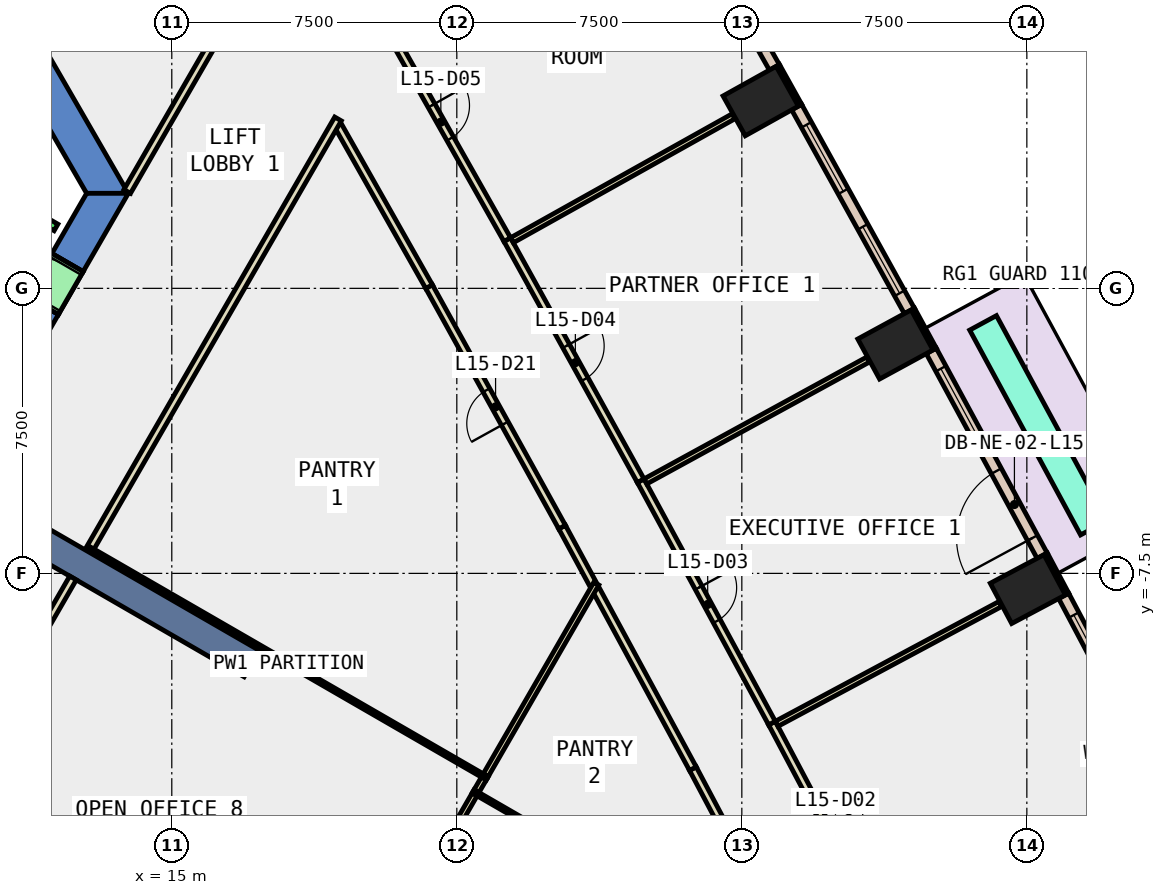
"""IFC4 building model, lengths in metres.
Left out: names, types, materials, properties, quantities, classifications, styles, units other than length and angle.
Written with IfcOpenShell. Run it as: python <this file> out.ifc"""

import sys

from ifc_helpers import new_model, si_unit, direction, frame, frame_2d, origin, origin_2d, place, context, subcontext, project, spatial, polyline, rectangle, outline, extrude, element, fill, save


model = new_model("IFC4")
c1 = context("Model", 3, precision=1e-05, world=origin(), true_north=direction((0.0, 1.0)))
c2 = subcontext(c1, "Body", "Model", "MODEL_VIEW")
j1 = project(units=[si_unit("LENGTHUNIT", "METRE"), si_unit("PLANEANGLEUNIT", "RADIAN")], contexts=[c1])
p1 = place(None, origin())
s1 = spatial("IfcSite", under=j1, at=p1, CompositionType="ELEMENT")
p2 = place(p1, origin())
s2 = spatial("IfcBuilding", under=s1, at=p2, CompositionType="ELEMENT")
p3 = place(p2, frame((0.0, 0.0, 72.8)))
s3 = spatial("IfcBuildingStorey", under=s2, at=p3, CompositionType="ELEMENT", Elevation=72.8)
for number, where, z_axis, x_axis in (
    (1, (37.526, -7.914, -0.4), (0.0, 0.0, 1.0), (-0.469, 0.883, 0.0)),
    (2, (34.041, -1.477, -0.4), (0.0, 0.0, 1.0), (-0.478, 0.878, 0.0)),
    (3, (30.497, 4.928, -0.4), (0.0, 0.0, 1.0), (-0.487, 0.873, 0.0)),
):
    element("IfcColumn", number, at=place(p3, frame(where, z_axis=z_axis, x_axis=x_axis)), inside=s3, PredefinedType="COLUMN", context=c2, shape_type="SweptSolid", body=[
        extrude(rectangle(XDim=1.2, YDim=1.6, at=origin_2d()), origin(), (0.0, 0.0, 1.0), 4.2),
    ])
p4 = place(p3, frame((0.0, 0.0, -0.4)))
e4 = element("IfcWall", 4, at=p4, inside=s3, PredefinedType="SHEAR", context=c2, shape_type="SweptSolid", body=[
    extrude(outline(polyline([(8.517, 11.748), (7.694, 11.273), (12.759, 2.5), (13.856, 2.5), (8.517, 11.748)])), origin(), (0.0, 0.0, 1.0), 4.2),
])
p5 = place(p3, frame((0.0, 0.0, -0.4)))
e5 = element("IfcWall", 5, at=p5, inside=s3, PredefinedType="SHEAR", context=c2, shape_type="SweptSolid", body=[
    extrude(outline(polyline([(12.017, -0.686), (11.194, -0.211), (10.544, -1.336), (11.367, -1.811), (12.017, -0.686)])), origin(), (0.0, 0.0, 1.0), 4.2),
])
p6 = place(p3, frame((0.0, 0.0, -0.4)))
e6 = element("IfcWall", 6, at=p6, inside=s3, PredefinedType="SHEAR", context=c2, shape_type="SweptSolid", body=[
    extrude(outline(polyline([(11.844, 0.915), (12.667, 0.44), (13.856, 2.5), (12.759, 2.5), (11.844, 0.915)])), origin(), (0.0, 0.0, 1.0), 4.2),
])
p7 = place(p3, frame((0.0, 0.0, 3.6)))
e7 = element("IfcWall", 7, at=p7, inside=s3, PredefinedType="SHEAR", context=c2, shape_type="SweptSolid", body=[
    extrude(outline(polyline([(12.667, 0.44), (11.844, 0.915), (11.194, -0.211), (12.017, -0.686), (12.667, 0.44)])), origin(), (0.0, 0.0, 1.0), 0.2),
])
p8 = place(p3, frame((9.31, -5.375, -0.4), z_axis=(0.0, 0.0, 1.0), x_axis=(0.866017533419, -0.500013631625, 0.0)))
e8 = element("IfcWall", 8, at=p8, inside=s3, PredefinedType="SHEAR", context=c2, shape_type="SweptSolid", body=[
    extrude(rectangle(XDim=9.0, YDim=0.8, at=frame_2d((4.5, 0.0))), origin(), (0.0, 0.0, 1.0), 4.2),
])
p9 = place(p3, frame((38.558, -8.045, 0.0), z_axis=(0.0, 0.0, 1.0), x_axis=(-0.469467784567, 0.882949601763, 0.0)))
e9 = element("IfcWall", 9, at=p9, inside=s3, PredefinedType="STANDARD", context=c2, shape_type="SweptSolid", body=[
    extrude(rectangle(XDim=1.199, YDim=0.1, at=frame_2d((0.6, 0.0))), origin(), (0.0, 0.0, 1.0), 3.8),
])
p10 = place(p3, frame((35.074, -1.598, 0.0), z_axis=(0.0, 0.0, 1.0), x_axis=(-0.478267644701, 0.878214131082, 0.0)))
e10 = element("IfcWall", 10, at=p10, inside=s3, PredefinedType="STANDARD", context=c2, shape_type="SweptSolid", body=[
    extrude(rectangle(XDim=1.2, YDim=0.1, at=frame_2d((0.6, 0.0))), origin(), (0.0, 0.0, 1.0), 3.8),
])
p11 = place(p3, frame((31.531, 4.818, 0.0), z_axis=(0.0, 0.0, 1.0), x_axis=(-0.486817526853, 0.873503689488, 0.0)))
e11 = element("IfcWall", 11, at=p11, inside=s3, PredefinedType="STANDARD", context=c2, shape_type="SweptSolid", body=[
    extrude(rectangle(XDim=1.2, YDim=0.1, at=frame_2d((0.6, 0.0))), origin(), (0.0, 0.0, 1.0), 3.8),
])
p12 = place(p3, frame((41.409, -13.644, 0.0), z_axis=(0.0, 0.0, 1.0), x_axis=(-0.467968066899, 0.883745375299, 0.0)))
e12 = element("IfcWall", 12, at=p12, inside=s3, PredefinedType="STANDARD", context=c2, shape_type="SweptSolid", body=[
    extrude(rectangle(XDim=6.282, YDim=0.3, at=frame_2d((3.141, 0.0))), origin(), (0.0, 0.0, 1.0), 3.8),
])
p13 = place(p12, frame((0.571, 0.0, 0.9)))
e13 = element("IfcOpeningElement", 13, at=p13, cuts=e12, PredefinedType="OPENING", context=c2, shape_type="SweptSolid", body=[
    extrude(rectangle(XDim=2.0, YDim=2.6, at=frame_2d((1.0, 1.3))), frame((0.0, 0.16, 0.0), z_axis=(0.0, -1.0, 0.0), x_axis=(1.0, 0.0, 0.0)), (0.0, 0.0, 1.0), 0.32),
])
p14 = place(p12, frame((3.712, 0.0, 0.9)))
e14 = element("IfcOpeningElement", 14, at=p14, cuts=e12, PredefinedType="OPENING", context=c2, shape_type="SweptSolid", body=[
    extrude(rectangle(XDim=2.0, YDim=2.6, at=frame_2d((1.0, 1.3))), frame((0.0, 0.16, 0.0), z_axis=(0.0, -1.0, 0.0), x_axis=(1.0, 0.0, 0.0)), (0.0, 0.0, 1.0), 0.32),
])
p15 = place(p3, frame((37.903, -7.036, 0.0), z_axis=(0.0, 0.0, 1.0), x_axis=(-0.476174096946, 0.879351027404, 0.0)))
e15 = element("IfcWall", 15, at=p15, inside=s3, PredefinedType="STANDARD", context=c2, shape_type="SweptSolid", body=[
    extrude(rectangle(XDim=6.131, YDim=0.3, at=frame_2d((3.065, 0.0))), origin(), (0.0, 0.0, 1.0), 3.8),
])
p16 = place(p15, frame((0.533, 0.0, 0.0)))
e16 = element("IfcOpeningElement", 16, at=p16, cuts=e15, PredefinedType="OPENING", context=c2, shape_type="SweptSolid", body=[
    extrude(rectangle(XDim=2.0, YDim=2.4, at=frame_2d((1.0, 1.2))), frame((0.0, 0.16, 0.0), z_axis=(0.0, -1.0, 0.0), x_axis=(1.0, 0.0, 0.0)), (0.0, 0.0, 1.0), 0.32),
])
p17 = place(p15, frame((3.598, 0.0, 0.9)))
e17 = element("IfcOpeningElement", 17, at=p17, cuts=e15, PredefinedType="OPENING", context=c2, shape_type="SweptSolid", body=[
    extrude(rectangle(XDim=2.0, YDim=2.6, at=frame_2d((1.0, 1.3))), frame((0.0, 0.16, 0.0), z_axis=(0.0, -1.0, 0.0), x_axis=(1.0, 0.0, 0.0)), (0.0, 0.0, 1.0), 0.32),
])
p18 = place(p3, frame((34.409, -0.595, 0.0), z_axis=(0.0, 0.0, 1.0), x_axis=(-0.484025698618, 0.875053782963, 0.0)))
e18 = element("IfcWall", 18, at=p18, inside=s3, PredefinedType="STANDARD", context=c2, shape_type="SweptSolid", body=[
    extrude(rectangle(XDim=6.13, YDim=0.3, at=frame_2d((3.065, 0.0))), origin(), (0.0, 0.0, 1.0), 3.8),
])
p19 = place(p18, frame((0.532, 0.0, 0.9)))
e19 = element("IfcOpeningElement", 19, at=p19, cuts=e18, PredefinedType="OPENING", context=c2, shape_type="SweptSolid", body=[
    extrude(rectangle(XDim=2.0, YDim=2.6, at=frame_2d((1.0, 1.3))), frame((0.0, 0.16, 0.0), z_axis=(0.0, -1.0, 0.0), x_axis=(1.0, 0.0, 0.0)), (0.0, 0.0, 1.0), 0.32),
])
p20 = place(p18, frame((3.597, 0.0, 0.9)))
e20 = element("IfcOpeningElement", 20, at=p20, cuts=e18, PredefinedType="OPENING", context=c2, shape_type="SweptSolid", body=[
    extrude(rectangle(XDim=2.0, YDim=2.6, at=frame_2d((1.0, 1.3))), frame((0.0, 0.16, 0.0), z_axis=(0.0, -1.0, 0.0), x_axis=(1.0, 0.0, 0.0)), (0.0, 0.0, 1.0), 0.32),
])
p21 = place(p3, frame((30.857, 5.814, 0.0), z_axis=(0.0, 0.0, 1.0), x_axis=(-0.492097935349, 0.870539845168, 0.0)))
e21 = element("IfcWall", 21, at=p21, inside=s3, PredefinedType="STANDARD", context=c2, shape_type="SweptSolid", body=[
    extrude(rectangle(XDim=6.131, YDim=0.3, at=frame_2d((3.065, 0.0))), origin(), (0.0, 0.0, 1.0), 3.8),
])
p22 = place(p21, frame((0.533, 0.0, 0.9)))
e22 = element("IfcOpeningElement", 22, at=p22, cuts=e21, PredefinedType="OPENING", context=c2, shape_type="SweptSolid", body=[
    extrude(rectangle(XDim=2.0, YDim=2.6, at=frame_2d((1.0, 1.3))), frame((0.0, 0.16, 0.0), z_axis=(0.0, -1.0, 0.0), x_axis=(1.0, 0.0, 0.0)), (0.0, 0.0, 1.0), 0.32),
])
p23 = place(p21, frame((3.598, 0.0, 0.9)))
e23 = element("IfcOpeningElement", 23, at=p23, cuts=e21, PredefinedType="OPENING", context=c2, shape_type="SweptSolid", body=[
    extrude(rectangle(XDim=2.0, YDim=2.6, at=frame_2d((1.0, 1.3))), frame((0.0, 0.16, 0.0), z_axis=(0.0, -1.0, 0.0), x_axis=(1.0, 0.0, 0.0)), (0.0, 0.0, 1.0), 0.32),
])
p24 = place(p3, frame((39.266, -6.298, 0.0), z_axis=(0.0, 0.0, 1.0), x_axis=(-0.476100931161, 0.8793906432, 0.0)))
e24 = element("IfcWall", 24, at=p24, inside=s3, PredefinedType="STANDARD", context=c2, shape_type="SweptSolid", body=[
    extrude(rectangle(XDim=6.129, YDim=0.8, at=frame_2d((3.065, 0.0))), origin(), (0.0, 0.0, 1.0), 0.8),
])
p25 = place(p3, frame((26.086, -7.789, 0.0), z_axis=(0.0, 0.0, 1.0), x_axis=(-0.475856505621, 0.879522930945, 0.0)))
e25 = element("IfcWall", 25, at=p25, inside=s3, PredefinedType="PARTITIONING", context=c2, shape_type="SweptSolid", body=[
    extrude(rectangle(XDim=1.715, YDim=0.2, at=frame_2d((0.857, 0.0))), origin(), (0.0, 0.0, 1.0), 3.8),
])
p26 = place(p3, frame((25.27, -6.281, 0.0), z_axis=(0.0, 0.0, 1.0), x_axis=(-0.484062485326, 0.875033433818, 0.0)))
e26 = element("IfcWall", 26, at=p26, inside=s3, PredefinedType="PARTITIONING", context=c2, shape_type="SweptSolid", body=[
    extrude(rectangle(XDim=7.23, YDim=0.2, at=frame_2d((3.615, 0.0))), origin(), (0.0, 0.0, 1.0), 3.8),
])
p27 = place(p26, frame((3.115, 0.0, 0.0)))
e27 = element("IfcOpeningElement", 27, at=p27, cuts=e26, PredefinedType="OPENING", context=c2, shape_type="SweptSolid", body=[
    extrude(rectangle(XDim=1.0, YDim=2.1, at=frame_2d((0.5, 1.05))), frame((0.0, 0.11, 0.0), z_axis=(0.0, -1.0, 0.0), x_axis=(1.0, 0.0, 0.0)), (0.0, 0.0, 1.0), 0.22),
])
p28 = place(p3, frame((21.77, 0.046, 0.0), z_axis=(0.0, 0.0, 1.0), x_axis=(-0.492148137455, 0.870511465059, 0.0)))
e28 = element("IfcWall", 28, at=p28, inside=s3, PredefinedType="PARTITIONING", context=c2, shape_type="SweptSolid", body=[
    extrude(rectangle(XDim=4.868, YDim=0.2, at=frame_2d((2.434, 0.0))), origin(), (0.0, 0.0, 1.0), 3.8),
])
p29 = place(p3, frame((31.668, -18.219, 0.0), z_axis=(0.0, 0.0, 1.0), x_axis=(-0.468058220157, 0.883697630722, 0.0)))
e29 = element("IfcWall", 29, at=p29, inside=s3, PredefinedType="PARTITIONING", context=c2, shape_type="SweptSolid", body=[
    extrude(rectangle(XDim=6.316, YDim=0.2, at=frame_2d((3.158, 0.0))), origin(), (0.0, 0.0, 1.0), 3.8),
])
p30 = place(p29, frame((2.658, 0.0, 0.0)))
e30 = element("IfcOpeningElement", 30, at=p30, cuts=e29, PredefinedType="OPENING", context=c2, shape_type="SweptSolid", body=[
    extrude(rectangle(XDim=1.0, YDim=2.1, at=frame_2d((0.5, 1.05))), frame((0.0, 0.11, 0.0), z_axis=(0.0, -1.0, 0.0), x_axis=(1.0, 0.0, 0.0)), (0.0, 0.0, 1.0), 0.22),
])
p31 = place(p3, frame((28.712, -12.638, 0.0), z_axis=(0.0, 0.0, 1.0), x_axis=(-0.476123321927, 0.8793785205, 0.0)))
e31 = element("IfcWall", 31, at=p31, inside=s3, PredefinedType="PARTITIONING", context=c2, shape_type="SweptSolid", body=[
    extrude(rectangle(XDim=5.364, YDim=0.2, at=frame_2d((2.682, 0.0))), origin(), (0.0, 0.0, 1.0), 3.8),
])
p32 = place(p3, frame((30.793, -11.439, 0.0), z_axis=(0.0, 0.0, 1.0), x_axis=(0.468043291185, -0.883705537822, 0.0)))
e32 = element("IfcWall", 32, at=p32, inside=s3, PredefinedType="PARTITIONING", context=c2, shape_type="SweptSolid", body=[
    extrude(rectangle(XDim=7.066, YDim=0.2, at=frame_2d((3.533, 0.0))), origin(), (0.0, 0.0, 1.0), 3.8),
])
p33 = place(p32, frame((3.071, 0.0, 0.0)))
e33 = element("IfcOpeningElement", 33, at=p33, cuts=e32, PredefinedType="OPENING", context=c2, shape_type="SweptSolid", body=[
    extrude(rectangle(XDim=1.0, YDim=2.1, at=frame_2d((0.5, 1.05))), frame((0.0, 0.11, 0.0), z_axis=(0.0, -1.0, 0.0), x_axis=(1.0, 0.0, 0.0)), (0.0, 0.0, 1.0), 0.22),
])
p34 = place(p3, frame((27.339, -5.062, 0.0), z_axis=(0.0, 0.0, 1.0), x_axis=(0.476248444599, -0.879310763619, 0.0)))
e34 = element("IfcWall", 34, at=p34, inside=s3, PredefinedType="PARTITIONING", context=c2, shape_type="SweptSolid", body=[
    extrude(rectangle(XDim=7.252, YDim=0.2, at=frame_2d((3.626, 0.0))), origin(), (0.0, 0.0, 1.0), 3.8),
])
p35 = place(p34, frame((3.201, 0.0, 0.0)))
e35 = element("IfcOpeningElement", 35, at=p35, cuts=e34, PredefinedType="OPENING", context=c2, shape_type="SweptSolid", body=[
    extrude(rectangle(XDim=1.0, YDim=2.1, at=frame_2d((0.5, 1.05))), frame((0.0, 0.11, 0.0), z_axis=(0.0, -1.0, 0.0), x_axis=(1.0, 0.0, 0.0)), (0.0, 0.0, 1.0), 0.22),
])
p36 = place(p3, frame((23.828, 1.283, 0.0), z_axis=(0.0, 0.0, 1.0), x_axis=(0.484064127728, -0.875032525251, 0.0)))
e36 = element("IfcWall", 36, at=p36, inside=s3, PredefinedType="PARTITIONING", context=c2, shape_type="SweptSolid", body=[
    extrude(rectangle(XDim=7.251, YDim=0.2, at=frame_2d((3.625, 0.0))), origin(), (0.0, 0.0, 1.0), 3.8),
])
p37 = place(p36, frame((3.201, 0.0, 0.0)))
e37 = element("IfcOpeningElement", 37, at=p37, cuts=e36, PredefinedType="OPENING", context=c2, shape_type="SweptSolid", body=[
    extrude(rectangle(XDim=1.0, YDim=2.1, at=frame_2d((0.5, 1.05))), frame((0.0, 0.11, 0.0), z_axis=(0.0, -1.0, 0.0), x_axis=(1.0, 0.0, 0.0)), (0.0, 0.0, 1.0), 0.22),
])
p38 = place(p3, frame((20.259, 7.596, 0.0), z_axis=(0.0, 0.0, 1.0), x_axis=(0.492021755503, -0.870582903641, 0.0)))
e38 = element("IfcWall", 38, at=p38, inside=s3, PredefinedType="PARTITIONING", context=c2, shape_type="SweptSolid", body=[
    extrude(rectangle(XDim=7.251, YDim=0.2, at=frame_2d((3.626, 0.0))), origin(), (0.0, 0.0, 1.0), 3.8),
])
p39 = place(p38, frame((3.201, 0.0, 0.0)))
e39 = element("IfcOpeningElement", 39, at=p39, cuts=e38, PredefinedType="OPENING", context=c2, shape_type="SweptSolid", body=[
    extrude(rectangle(XDim=1.0, YDim=2.1, at=frame_2d((0.5, 1.05))), frame((0.0, 0.11, 0.0), z_axis=(0.0, -1.0, 0.0), x_axis=(1.0, 0.0, 0.0)), (0.0, 0.0, 1.0), 0.22),
])
p40 = place(p3, frame((13.827, 2.55, 0.0), z_axis=(0.0, 0.0, 1.0), x_axis=(0.500039204794, 0.866002767703, 0.0)))
e40 = element("IfcWall", 40, at=p40, inside=s3, PredefinedType="PARTITIONING", context=c2, shape_type="SweptSolid", body=[
    extrude(rectangle(XDim=6.672, YDim=0.2, at=frame_2d((3.336, 0.0))), origin(), (0.0, 0.0, 1.0), 3.8),
])
p41 = place(p3, frame((12.4, -7.621, 0.0), z_axis=(0.0, 0.0, 1.0), x_axis=(-0.49990497871, -0.866080257402, 0.0)))
e41 = element("IfcWall", 41, at=p41, inside=s3, PredefinedType="PARTITIONING", context=c2, shape_type="SweptSolid", body=[
    extrude(rectangle(XDim=9.302, YDim=0.2, at=frame_2d((4.651, 0.0))), origin(), (0.0, 0.0, 1.0), 3.8),
])
p42 = place(p3, frame((19.374, 4.458, 0.0), z_axis=(0.0, 0.0, 1.0), x_axis=(-0.499973880856, -0.866040483154, 0.0)))
e42 = element("IfcWall", 42, at=p42, inside=s3, PredefinedType="PARTITIONING", context=c2, shape_type="SweptSolid", body=[
    extrude(rectangle(XDim=13.113, YDim=0.2, at=frame_2d((6.556, 0.0))), origin(), (0.0, 0.0, 1.0), 3.8),
])
p43 = place(p3, frame((12.843, -6.855, 0.0), z_axis=(0.0, 0.0, 1.0), x_axis=(0.866054959007, -0.499948805358, 0.0)))
e43 = element("IfcWall", 43, at=p43, inside=s3, PredefinedType="PARTITIONING", context=c2, shape_type="SweptSolid", body=[
    extrude(rectangle(XDim=12.075, YDim=0.1, at=frame_2d((6.038, 0.0))), origin(), (0.0, 0.0, 1.0), 3.8),
])
p44 = place(p3, frame((22.969, -13.316, 0.0), z_axis=(0.0, 0.0, 1.0), x_axis=(-0.500007312183, -0.866021182053, 0.0)))
e44 = element("IfcWall", 44, at=p44, inside=s3, PredefinedType="PARTITIONING", context=c2, shape_type="SweptSolid", body=[
    extrude(rectangle(XDim=6.306, YDim=0.15, at=frame_2d((3.153, 0.0))), origin(), (0.0, 0.0, 1.0), 3.8),
])
p45 = place(p3, frame((23.211, -12.898, 0.0), z_axis=(0.0, 0.0, 1.0), x_axis=(-0.501488909663, -0.865164073159, 0.0)))
e45 = element("IfcWall", 45, at=p45, inside=s3, PredefinedType="PARTITIONING", context=c2, shape_type="SweptSolid", body=[
    extrude(rectangle(XDim=0.383, YDim=0.15, at=frame_2d((0.191, 0.0))), origin(), (0.0, 0.0, 1.0), 3.8),
])
p46 = place(p3, frame((26.172, -7.768, 0.0), z_axis=(0.0, 0.0, 1.0), x_axis=(-0.499945058274, -0.866057122081, 0.0)))
e46 = element("IfcWall", 46, at=p46, inside=s3, PredefinedType="PARTITIONING", context=c2, shape_type="SweptSolid", body=[
    extrude(rectangle(XDim=5.823, YDim=0.15, at=frame_2d((2.912, 0.0))), origin(), (0.0, 0.0, 1.0), 3.8),
])
p47 = place(p3, frame((22.929, -13.235, 0.0), z_axis=(0.0, 0.0, 1.0), x_axis=(0.866003823807, -0.500037375755, 0.0)))
e47 = element("IfcWall", 47, at=p47, inside=s3, PredefinedType="PARTITIONING", context=c2, shape_type="SweptSolid", body=[
    extrude(rectangle(XDim=10.245, YDim=0.1, at=frame_2d((5.123, 0.0))), origin(), (0.0, 0.0, 1.0), 3.8),
])
p48 = place(p3, frame((30.916, -11.458, 0.0), z_axis=(0.0, 0.0, 1.0), x_axis=(0.881525059883, 0.472137235132, 0.0)))
e48 = element("IfcWall", 48, at=p48, inside=s3, PredefinedType="PARTITIONING", context=c2, shape_type="SweptSolid", body=[
    extrude(rectangle(XDim=6.68, YDim=0.15, at=frame_2d((3.34, 0.0))), origin(), (0.0, 0.0, 1.0), 3.8),
])
p49 = place(p3, frame((27.463, -5.08, 0.0), z_axis=(0.0, 0.0, 1.0), x_axis=(0.877227104806, 0.480075625911, 0.0)))
e49 = element("IfcWall", 49, at=p49, inside=s3, PredefinedType="PARTITIONING", context=c2, shape_type="SweptSolid", body=[
    extrude(rectangle(XDim=6.68, YDim=0.15, at=frame_2d((3.34, 0.0))), origin(), (0.0, 0.0, 1.0), 3.8),
])
p50 = place(p3, frame((23.951, 1.266, 0.0), z_axis=(0.0, 0.0, 1.0), x_axis=(0.872786908026, 0.488101437385, 0.0)))
e50 = element("IfcWall", 50, at=p50, inside=s3, PredefinedType="PARTITIONING", context=c2, shape_type="SweptSolid", body=[
    extrude(rectangle(XDim=6.681, YDim=0.15, at=frame_2d((3.34, 0.0))), origin(), (0.0, 0.0, 1.0), 3.8),
])
p51 = place(p3, frame((9.788, 2.853, 0.0), z_axis=(0.0, 0.0, 1.0), x_axis=(0.865998541277, -0.500046524342, 0.0)))
e51 = element("IfcWall", 51, at=p51, inside=s3, PredefinedType="STANDARD", context=c2, shape_type="SweptSolid", body=[
    extrude(rectangle(XDim=2.5, YDim=0.2, at=frame_2d((1.25, 0.0))), origin(), (0.0, 0.0, 1.0), 3.8),
])
p52 = place(p3, frame((11.498, -0.385, 0.0), z_axis=(0.0, 0.0, 1.0), x_axis=(0.500221244143, 0.865897630733, 0.0)))
e52 = element("IfcWall", 52, at=p52, inside=s3, PredefinedType="STANDARD", context=c2, shape_type="SweptSolid", body=[
    extrude(rectangle(XDim=1.299, YDim=1.2, at=frame_2d((0.65, 0.0))), origin(), (0.0, 0.0, 1.0), 2.4),
])
p53 = place(p52, frame((0.1, 0.0, 0.0)))
e53 = element("IfcOpeningElement", 53, at=p53, cuts=e52, PredefinedType="OPENING", context=c2, shape_type="SweptSolid", body=[
    extrude(rectangle(XDim=1.1, YDim=2.3, at=frame_2d((0.55, 1.15))), frame((0.0, 0.61, 0.0), z_axis=(0.0, -1.0, 0.0), x_axis=(1.0, 0.0, 0.0)), (0.0, 0.0, 1.0), 1.22),
])
p54 = place(p14, origin())
e54 = element("IfcWindow", 54, at=p54, inside=s3, PartitioningType="SINGLE_PANEL", PredefinedType="WINDOW", context=c2, shape_type="SweptSolid", body=[
    extrude(rectangle(XDim=2.0, YDim=2.6, at=frame_2d((1.0, 1.3))), frame((0.0, 0.03, 0.0), z_axis=(0.0, -1.0, 0.0), x_axis=(1.0, 0.0, 0.0)), (0.0, 0.0, 1.0), 0.06),
])
fill(e14, e54)
p55 = place(p16, origin())
e55 = element("IfcDoor", 55, at=p55, inside=s3, OperationType="SLIDING_TO_LEFT", PredefinedType="DOOR", context=c2, shape_type="SweptSolid", body=[
    extrude(rectangle(XDim=2.0, YDim=2.4, at=frame_2d((1.0, 1.2))), frame((0.0, 0.025, 0.0), z_axis=(0.0, -1.0, 0.0), x_axis=(1.0, 0.0, 0.0)), (0.0, 0.0, 1.0), 0.05),
])
fill(e16, e55)
p56 = place(p17, origin())
e56 = element("IfcWindow", 56, at=p56, inside=s3, PartitioningType="SINGLE_PANEL", PredefinedType="WINDOW", context=c2, shape_type="SweptSolid", body=[
    extrude(rectangle(XDim=2.0, YDim=2.6, at=frame_2d((1.0, 1.3))), frame((0.0, 0.03, 0.0), z_axis=(0.0, -1.0, 0.0), x_axis=(1.0, 0.0, 0.0)), (0.0, 0.0, 1.0), 0.06),
])
fill(e17, e56)
p57 = place(p19, origin())
e57 = element("IfcWindow", 57, at=p57, inside=s3, PartitioningType="SINGLE_PANEL", PredefinedType="WINDOW", context=c2, shape_type="SweptSolid", body=[
    extrude(rectangle(XDim=2.0, YDim=2.6, at=frame_2d((1.0, 1.3))), frame((0.0, 0.03, 0.0), z_axis=(0.0, -1.0, 0.0), x_axis=(1.0, 0.0, 0.0)), (0.0, 0.0, 1.0), 0.06),
])
fill(e19, e57)
p58 = place(p20, origin())
e58 = element("IfcWindow", 58, at=p58, inside=s3, PartitioningType="SINGLE_PANEL", PredefinedType="WINDOW", context=c2, shape_type="SweptSolid", body=[
    extrude(rectangle(XDim=2.0, YDim=2.6, at=frame_2d((1.0, 1.3))), frame((0.0, 0.03, 0.0), z_axis=(0.0, -1.0, 0.0), x_axis=(1.0, 0.0, 0.0)), (0.0, 0.0, 1.0), 0.06),
])
fill(e20, e58)
p59 = place(p35, origin())
e59 = element("IfcDoor", 59, at=p59, inside=s3, OperationType="SINGLE_SWING_LEFT", PredefinedType="DOOR", context=c2, shape_type="SweptSolid", body=[
    extrude(rectangle(XDim=1.0, YDim=2.1, at=frame_2d((0.5, 1.05))), frame((0.0, 0.025, 0.0), z_axis=(0.0, -1.0, 0.0), x_axis=(1.0, 0.0, 0.0)), (0.0, 0.0, 1.0), 0.05),
])
fill(e35, e59)
p60 = place(p37, origin())
e60 = element("IfcDoor", 60, at=p60, inside=s3, OperationType="SINGLE_SWING_LEFT", PredefinedType="DOOR", context=c2, shape_type="SweptSolid", body=[
    extrude(rectangle(XDim=1.0, YDim=2.1, at=frame_2d((0.5, 1.05))), frame((0.0, 0.025, 0.0), z_axis=(0.0, -1.0, 0.0), x_axis=(1.0, 0.0, 0.0)), (0.0, 0.0, 1.0), 0.05),
])
fill(e37, e60)
p61 = place(p39, origin())
e61 = element("IfcDoor", 61, at=p61, inside=s3, OperationType="SINGLE_SWING_LEFT", PredefinedType="DOOR", context=c2, shape_type="SweptSolid", body=[
    extrude(rectangle(XDim=1.0, YDim=2.1, at=frame_2d((0.5, 1.05))), frame((0.0, 0.025, 0.0), z_axis=(0.0, -1.0, 0.0), x_axis=(1.0, 0.0, 0.0)), (0.0, 0.0, 1.0), 0.05),
])
fill(e39, e61)
p62 = place(p27, origin())
e62 = element("IfcDoor", 62, at=p62, inside=s3, OperationType="SINGLE_SWING_RIGHT", PredefinedType="DOOR", context=c2, shape_type="SweptSolid", body=[
    extrude(rectangle(XDim=1.0, YDim=2.1, at=frame_2d((0.5, 1.05))), frame((0.0, 0.025, 0.0), z_axis=(0.0, -1.0, 0.0), x_axis=(1.0, 0.0, 0.0)), (0.0, 0.0, 1.0), 0.05),
])
fill(e27, e62)
p63 = place(p53, origin())
e63 = element("IfcDoor", 63, at=p63, inside=s3, OperationType="SLIDING_TO_LEFT", PredefinedType="DOOR", context=c2, shape_type="SweptSolid", body=[
    extrude(rectangle(XDim=1.1, YDim=2.3, at=frame_2d((0.55, 1.15))), frame((0.0, 0.025, 0.0), z_axis=(0.0, -1.0, 0.0), x_axis=(1.0, 0.0, 0.0)), (0.0, 0.0, 1.0), 0.05),
])
fill(e53, e63)
save(model, sys.argv[1])
